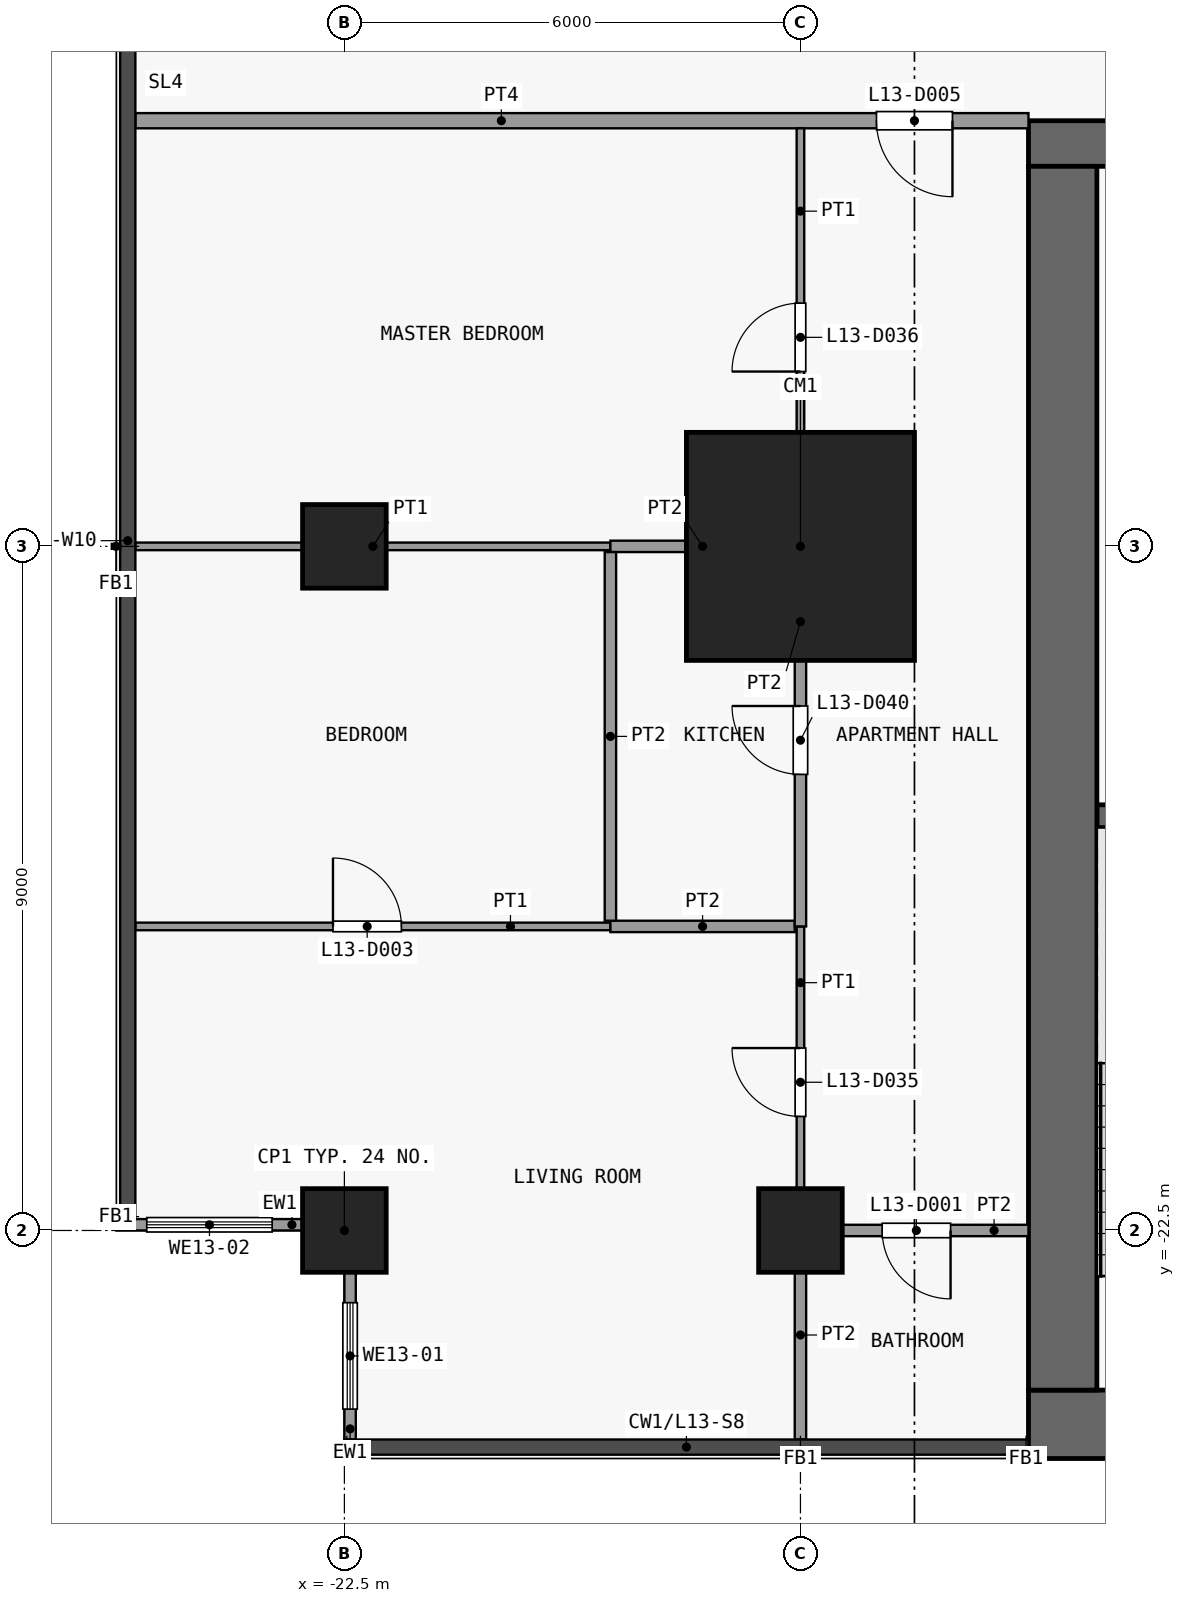
"""IFC4 building model, lengths in metres.
Left out: names, types, materials, properties, quantities, classifications, styles, units other than length and angle.
Written with IfcOpenShell. Run it as: python <this file> out.ifc"""

import sys

from ifc_helpers import new_model, si_unit, direction, frame, frame_2d, origin, origin_2d, place, context, subcontext, project, spatial, rectangle, extrude, element, fill, save


model = new_model("IFC4")
c1 = context("Model", 3, precision=1e-05, world=origin(), true_north=direction((0.0, 1.0)))
c2 = subcontext(c1, "Body", "Model", "MODEL_VIEW")
j1 = project(units=[si_unit("LENGTHUNIT", "METRE"), si_unit("PLANEANGLEUNIT", "RADIAN")], contexts=[c1])
p1 = place(None, origin())
s1 = spatial("IfcSite", under=j1, at=p1, CompositionType="ELEMENT")
p2 = place(p1, origin())
s2 = spatial("IfcBuilding", under=s1, at=p2, CompositionType="ELEMENT")
p3 = place(p2, frame((0.0, 0.0, 57.7)))
s3 = spatial("IfcBuildingStorey", under=s2, at=p3, CompositionType="ELEMENT", Elevation=57.7)
for number, where, z_axis, x_axis in (
    (1, (-22.5, -22.5, 0.0), (0.0, 0.0, 1.0), (1.0, 0.0, 0.0)),
    (2, (-22.5, -13.5, 0.0), (0.0, 0.0, 1.0), (1.0, 0.0, 0.0)),
    (3, (-16.5, -22.5, 0.0), (0.0, 0.0, 1.0), (1.0, 0.0, 0.0)),
):
    element("IfcColumn", number, at=place(p3, frame(where, z_axis=z_axis, x_axis=x_axis)), inside=s3, PredefinedType="COLUMN", context=c2, shape_type="SweptSolid", body=[
        extrude(rectangle(XDim=1.1, YDim=1.1, at=origin_2d()), origin(), (0.0, 0.0, 1.0), 3.6),
    ])
p4 = place(p3, frame((-16.5, -13.5, 0.0), z_axis=(0.0, 0.0, 1.0), x_axis=(1.0, 0.0, 0.0)))
e4 = element("IfcColumn", 4, at=p4, inside=s3, PredefinedType="COLUMN", context=c2, shape_type="SweptSolid", body=[
    extrude(rectangle(XDim=3.0, YDim=3.0, at=origin_2d()), origin(), (0.0, 0.0, 1.0), 3.6),
])
p5 = place(p3, frame((-13.5, -25.05, 0.0), z_axis=(0.0, 0.0, 1.0), x_axis=(1.0, 0.0, 0.0)))
e5 = element("IfcWall", 5, at=p5, inside=s3, PredefinedType="SHEAR", context=c2, shape_type="SweptSolid", body=[
    extrude(rectangle(XDim=27.0, YDim=0.9, at=frame_2d((13.5, 0.0))), origin(), (0.0, 0.0, 1.0), 3.3),
])
p6 = place(p3, frame((-13.5, -8.2, 0.0), z_axis=(0.0, 0.0, 1.0), x_axis=(1.0, 0.0, 0.0)))
e6 = element("IfcWall", 6, at=p6, inside=s3, PredefinedType="SHEAR", context=c2, shape_type="SweptSolid", body=[
    extrude(rectangle(XDim=27.0, YDim=0.6, at=frame_2d((13.5, 0.0))), origin(), (0.0, 0.0, 1.0), 3.3),
])
p7 = place(p6, frame((7.8, 0.0, 0.0)))
e7 = element("IfcOpeningElement", 7, at=p7, cuts=e6, PredefinedType="OPENING", context=c2, shape_type="SweptSolid", body=[
    extrude(rectangle(XDim=1.8, YDim=2.1, at=frame_2d((0.9, 1.05))), frame((0.0, 0.31, 0.0), z_axis=(0.0, -1.0, 0.0), x_axis=(1.0, 0.0, 0.0)), (0.0, 0.0, 1.0), 0.62),
])
p8 = place(p6, frame((17.4, 0.0, 0.0)))
e8 = element("IfcOpeningElement", 8, at=p8, cuts=e6, PredefinedType="OPENING", context=c2, shape_type="SweptSolid", body=[
    extrude(rectangle(XDim=1.8, YDim=2.1, at=frame_2d((0.9, 1.05))), frame((0.0, 0.31, 0.0), z_axis=(0.0, -1.0, 0.0), x_axis=(1.0, 0.0, 0.0)), (0.0, 0.0, 1.0), 0.62),
])
p9 = place(p6, frame((1.725, 0.0, 0.0)))
e9 = element("IfcOpeningElement", 9, at=p9, cuts=e6, PredefinedType="OPENING", context=c2, shape_type="SweptSolid", body=[
    extrude(rectangle(XDim=1.2, YDim=2.1, at=frame_2d((0.6, 1.05))), frame((0.0, 0.31, 0.0), z_axis=(0.0, -1.0, 0.0), x_axis=(1.0, 0.0, 0.0)), (0.0, 0.0, 1.0), 0.62),
])
p10 = place(p6, frame((23.375, 0.0, 0.0)))
e10 = element("IfcOpeningElement", 10, at=p10, cuts=e6, PredefinedType="OPENING", context=c2, shape_type="SweptSolid", body=[
    extrude(rectangle(XDim=0.9, YDim=2.1, at=frame_2d((0.45, 1.05))), frame((0.0, 0.31, 0.0), z_axis=(0.0, -1.0, 0.0), x_axis=(1.0, 0.0, 0.0)), (0.0, 0.0, 1.0), 0.62),
])
p11 = place(p3, frame((-13.05, -24.6, 0.0), z_axis=(0.0, 0.0, 1.0), x_axis=(0.0, 1.0, 0.0)))
e11 = element("IfcWall", 11, at=p11, inside=s3, PredefinedType="SHEAR", context=c2, shape_type="SweptSolid", body=[
    extrude(rectangle(XDim=16.1, YDim=0.9, at=frame_2d((8.05, 0.0))), origin(), (0.0, 0.0, 1.0), 3.3),
])
p12 = place(p3, frame((-12.6, -17.05, 0.0), z_axis=(0.0, 0.0, 1.0), x_axis=(1.0, 0.0, 0.0)))
e12 = element("IfcWall", 12, at=p12, inside=s3, PredefinedType="SHEAR", context=c2, shape_type="SweptSolid", body=[
    extrude(rectangle(XDim=2.85, YDim=0.3, at=frame_2d((1.425, 0.0))), origin(), (0.0, 0.0, 1.0), 3.3),
])
p13 = place(p3, frame((-22.425, -25.25, 0.0), z_axis=(0.0, 0.0, 1.0), x_axis=(0.0, 1.0, 0.0)))
e13 = element("IfcWall", 13, at=p13, inside=s3, PredefinedType="SOLIDWALL", context=c2, shape_type="SweptSolid", body=[
    extrude(rectangle(XDim=2.2, YDim=0.15, at=frame_2d((1.1, 0.0))), origin(), (0.0, 0.0, 1.0), 3.3),
])
p14 = place(p13, frame((0.4, 0.0, 0.9)))
e14 = element("IfcOpeningElement", 14, at=p14, cuts=e13, PredefinedType="OPENING", context=c2, shape_type="SweptSolid", body=[
    extrude(rectangle(XDim=1.4, YDim=2.4, at=frame_2d((0.7, 1.2))), frame((0.0, 0.085, 0.0), z_axis=(0.0, -1.0, 0.0), x_axis=(1.0, 0.0, 0.0)), (0.0, 0.0, 1.0), 0.17),
])
p15 = place(p3, frame((-23.05, -22.425, 0.0), z_axis=(0.0, 0.0, 1.0), x_axis=(-1.0, 0.0, 0.0)))
e15 = element("IfcWall", 15, at=p15, inside=s3, PredefinedType="SOLIDWALL", context=c2, shape_type="SweptSolid", body=[
    extrude(rectangle(XDim=2.45, YDim=0.15, at=frame_2d((1.225, 0.0))), origin(), (0.0, 0.0, 1.0), 3.3),
])
p16 = place(p15, frame((0.4, 0.0, 0.9)))
e16 = element("IfcOpeningElement", 16, at=p16, cuts=e15, PredefinedType="OPENING", context=c2, shape_type="SweptSolid", body=[
    extrude(rectangle(XDim=1.65, YDim=2.4, at=frame_2d((0.825, 1.2))), frame((0.0, 0.085, 0.0), z_axis=(0.0, -1.0, 0.0), x_axis=(1.0, 0.0, 0.0)), (0.0, 0.0, 1.0), 0.17),
])
p17 = place(p3, frame((-16.425, -22.5, 0.0), z_axis=(0.0, 0.0, 1.0), x_axis=(1.0, 0.0, 0.0)))
e17 = element("IfcWall", 17, at=p17, inside=s3, PredefinedType="PARTITIONING", context=c2, shape_type="SweptSolid", body=[
    extrude(rectangle(XDim=2.925, YDim=0.15, at=frame_2d((1.462, 0.0))), origin(), (0.0, 0.0, 1.0), 3.3),
])
p18 = place(p17, frame((1.0, 0.0, 0.0)))
e18 = element("IfcOpeningElement", 18, at=p18, cuts=e17, PredefinedType="OPENING", context=c2, shape_type="SweptSolid", body=[
    extrude(rectangle(XDim=0.9, YDim=2.1, at=frame_2d((0.45, 1.05))), frame((0.0, 0.085, 0.0), z_axis=(0.0, -1.0, 0.0), x_axis=(1.0, 0.0, 0.0)), (0.0, 0.0, 1.0), 0.17),
])
p19 = place(p3, frame((-25.25, -18.5, 0.0), z_axis=(0.0, 0.0, 1.0), x_axis=(1.0, 0.0, 0.0)))
e19 = element("IfcWall", 19, at=p19, inside=s3, PredefinedType="PARTITIONING", context=c2, shape_type="SweptSolid", body=[
    extrude(rectangle(XDim=6.25, YDim=0.1, at=frame_2d((3.125, 0.0))), origin(), (0.0, 0.0, 1.0), 3.3),
])
p20 = place(p19, frame((2.6, 0.0, 0.0)))
e20 = element("IfcOpeningElement", 20, at=p20, cuts=e19, PredefinedType="OPENING", context=c2, shape_type="SweptSolid", body=[
    extrude(rectangle(XDim=0.9, YDim=2.1, at=frame_2d((0.45, 1.05))), frame((0.0, 0.06, 0.0), z_axis=(0.0, -1.0, 0.0), x_axis=(1.0, 0.0, 0.0)), (0.0, 0.0, 1.0), 0.12),
])
p21 = place(p3, frame((-19.0, -18.5, 0.0), z_axis=(0.0, 0.0, 1.0), x_axis=(1.0, 0.0, 0.0)))
e21 = element("IfcWall", 21, at=p21, inside=s3, PredefinedType="PARTITIONING", context=c2, shape_type="SweptSolid", body=[
    extrude(rectangle(XDim=2.425, YDim=0.15, at=frame_2d((1.212, 0.0))), origin(), (0.0, 0.0, 1.0), 3.3),
])
p22 = place(p3, frame((-25.25, -13.5, 0.0), z_axis=(0.0, 0.0, 1.0), x_axis=(1.0, 0.0, 0.0)))
e22 = element("IfcWall", 22, at=p22, inside=s3, PredefinedType="PARTITIONING", context=c2, shape_type="SweptSolid", body=[
    extrude(rectangle(XDim=6.25, YDim=0.1, at=frame_2d((3.125, 0.0))), origin(), (0.0, 0.0, 1.0), 3.3),
])
p23 = place(p3, frame((-19.0, -13.5, 0.0), z_axis=(0.0, 0.0, 1.0), x_axis=(1.0, 0.0, 0.0)))
e23 = element("IfcWall", 23, at=p23, inside=s3, PredefinedType="PARTITIONING", context=c2, shape_type="SweptSolid", body=[
    extrude(rectangle(XDim=2.425, YDim=0.15, at=frame_2d((1.212, 0.0))), origin(), (0.0, 0.0, 1.0), 3.3),
])
p24 = place(p3, frame((-25.25, -7.9, 0.0), z_axis=(0.0, 0.0, 1.0), x_axis=(1.0, 0.0, 0.0)))
e24 = element("IfcWall", 24, at=p24, inside=s3, PredefinedType="PARTITIONING", context=c2, shape_type="SweptSolid", body=[
    extrude(rectangle(XDim=11.75, YDim=0.2, at=frame_2d((5.875, 0.0))), origin(), (0.0, 0.0, 1.0), 3.3),
])
p25 = place(p24, frame((9.75, 0.0, 0.0)))
e25 = element("IfcOpeningElement", 25, at=p25, cuts=e24, PredefinedType="OPENING", context=c2, shape_type="SweptSolid", body=[
    extrude(rectangle(XDim=1.0, YDim=2.1, at=frame_2d((0.5, 1.05))), frame((0.0, 0.11, 0.0), z_axis=(0.0, -1.0, 0.0), x_axis=(1.0, 0.0, 0.0)), (0.0, 0.0, 1.0), 0.22),
])
p26 = place(p3, frame((-19.0, -18.425, 0.0), z_axis=(0.0, 0.0, 1.0), x_axis=(0.0, 1.0, 0.0)))
e26 = element("IfcWall", 26, at=p26, inside=s3, PredefinedType="PARTITIONING", context=c2, shape_type="SweptSolid", body=[
    extrude(rectangle(XDim=4.85, YDim=0.15, at=frame_2d((2.425, 0.0))), origin(), (0.0, 0.0, 1.0), 3.3),
])
p27 = place(p3, frame((-16.5, -22.5, 0.0), z_axis=(0.0, 0.0, 1.0), x_axis=(0.0, 1.0, 0.0)))
e27 = element("IfcWall", 27, at=p27, inside=s3, PredefinedType="PARTITIONING", context=c2, shape_type="SweptSolid", body=[
    extrude(rectangle(XDim=4.0, YDim=0.1, at=frame_2d((2.0, 0.0))), origin(), (0.0, 0.0, 1.0), 3.3),
])
p28 = place(p27, frame((1.5, 0.0, 0.0)))
e28 = element("IfcOpeningElement", 28, at=p28, cuts=e27, PredefinedType="OPENING", context=c2, shape_type="SweptSolid", body=[
    extrude(rectangle(XDim=0.9, YDim=2.1, at=frame_2d((0.45, 1.05))), frame((0.0, 0.06, 0.0), z_axis=(0.0, -1.0, 0.0), x_axis=(1.0, 0.0, 0.0)), (0.0, 0.0, 1.0), 0.12),
])
p29 = place(p3, frame((-16.5, -13.5, 0.0), z_axis=(0.0, 0.0, 1.0), x_axis=(0.0, 1.0, 0.0)))
e29 = element("IfcWall", 29, at=p29, inside=s3, PredefinedType="PARTITIONING", context=c2, shape_type="SweptSolid", body=[
    extrude(rectangle(XDim=5.5, YDim=0.1, at=frame_2d((2.75, 0.0))), origin(), (0.0, 0.0, 1.0), 3.3),
])
p30 = place(p29, frame((2.3, 0.0, 0.0)))
e30 = element("IfcOpeningElement", 30, at=p30, cuts=e29, PredefinedType="OPENING", context=c2, shape_type="SweptSolid", body=[
    extrude(rectangle(XDim=0.9, YDim=2.1, at=frame_2d((0.45, 1.05))), frame((0.0, 0.06, 0.0), z_axis=(0.0, -1.0, 0.0), x_axis=(1.0, 0.0, 0.0)), (0.0, 0.0, 1.0), 0.12),
])
p31 = place(p3, frame((-16.5, -25.25, 0.0), z_axis=(0.0, 0.0, 1.0), x_axis=(0.0, 1.0, 0.0)))
e31 = element("IfcWall", 31, at=p31, inside=s3, PredefinedType="PARTITIONING", context=c2, shape_type="SweptSolid", body=[
    extrude(rectangle(XDim=2.75, YDim=0.15, at=frame_2d((1.375, 0.0))), origin(), (0.0, 0.0, 1.0), 3.3),
])
p32 = place(p3, frame((-16.5, -18.5, 0.0), z_axis=(0.0, 0.0, 1.0), x_axis=(0.0, 1.0, 0.0)))
e32 = element("IfcWall", 32, at=p32, inside=s3, PredefinedType="PARTITIONING", context=c2, shape_type="SweptSolid", body=[
    extrude(rectangle(XDim=5.0, YDim=0.15, at=frame_2d((2.5, 0.0))), origin(), (0.0, 0.0, 1.0), 3.3),
])
p33 = place(p32, frame((2.0, 0.0, 0.0)))
e33 = element("IfcOpeningElement", 33, at=p33, cuts=e32, PredefinedType="OPENING", context=c2, shape_type="SweptSolid", body=[
    extrude(rectangle(XDim=0.9, YDim=2.1, at=frame_2d((0.45, 1.05))), frame((0.0, 0.085, 0.0), z_axis=(0.0, -1.0, 0.0), x_axis=(1.0, 0.0, 0.0)), (0.0, 0.0, 1.0), 0.17),
])
p34 = place(p14, origin())
e34 = element("IfcWindow", 34, at=p34, inside=s3, PartitioningType="SINGLE_PANEL", PredefinedType="WINDOW", context=c2, shape_type="SweptSolid", body=[
    extrude(rectangle(XDim=1.4, YDim=2.4, at=frame_2d((0.7, 1.2))), frame((0.0, 0.03, 0.0), z_axis=(0.0, -1.0, 0.0), x_axis=(1.0, 0.0, 0.0)), (0.0, 0.0, 1.0), 0.06),
])
fill(e14, e34)
p35 = place(p16, origin())
e35 = element("IfcWindow", 35, at=p35, inside=s3, PartitioningType="SINGLE_PANEL", PredefinedType="WINDOW", context=c2, shape_type="SweptSolid", body=[
    extrude(rectangle(XDim=1.65, YDim=2.4, at=frame_2d((0.825, 1.2))), frame((0.0, 0.03, 0.0), z_axis=(0.0, -1.0, 0.0), x_axis=(1.0, 0.0, 0.0)), (0.0, 0.0, 1.0), 0.06),
])
fill(e16, e35)
p36 = place(p18, origin())
e36 = element("IfcDoor", 36, at=p36, inside=s3, OperationType="SINGLE_SWING_RIGHT", PredefinedType="DOOR", context=c2, shape_type="SweptSolid", body=[
    extrude(rectangle(XDim=0.9, YDim=2.1, at=frame_2d((0.45, 1.05))), frame((0.0, 0.025, 0.0), z_axis=(0.0, -1.0, 0.0), x_axis=(1.0, 0.0, 0.0)), (0.0, 0.0, 1.0), 0.05),
])
fill(e18, e36)
p37 = place(p20, origin())
e37 = element("IfcDoor", 37, at=p37, inside=s3, OperationType="SINGLE_SWING_RIGHT", PredefinedType="DOOR", context=c2, shape_type="SweptSolid", body=[
    extrude(rectangle(XDim=0.9, YDim=2.1, at=frame_2d((0.45, 1.05))), frame((0.0, 0.025, 0.0), z_axis=(0.0, -1.0, 0.0), x_axis=(1.0, 0.0, 0.0)), (0.0, 0.0, 1.0), 0.05),
])
fill(e20, e37)
p38 = place(p25, origin())
e38 = element("IfcDoor", 38, at=p38, inside=s3, OperationType="SINGLE_SWING_RIGHT", PredefinedType="DOOR", context=c2, shape_type="SweptSolid", body=[
    extrude(rectangle(XDim=1.0, YDim=2.1, at=frame_2d((0.5, 1.05))), frame((0.0, 0.025, 0.0), z_axis=(0.0, -1.0, 0.0), x_axis=(1.0, 0.0, 0.0)), (0.0, 0.0, 1.0), 0.05),
])
fill(e25, e38)
p39 = place(p28, origin())
e39 = element("IfcDoor", 39, at=p39, inside=s3, OperationType="SINGLE_SWING_LEFT", PredefinedType="DOOR", context=c2, shape_type="SweptSolid", body=[
    extrude(rectangle(XDim=0.9, YDim=2.1, at=frame_2d((0.45, 1.05))), frame((0.0, 0.025, 0.0), z_axis=(0.0, -1.0, 0.0), x_axis=(1.0, 0.0, 0.0)), (0.0, 0.0, 1.0), 0.05),
])
fill(e28, e39)
p40 = place(p30, origin())
e40 = element("IfcDoor", 40, at=p40, inside=s3, OperationType="SINGLE_SWING_RIGHT", PredefinedType="DOOR", context=c2, shape_type="SweptSolid", body=[
    extrude(rectangle(XDim=0.9, YDim=2.1, at=frame_2d((0.45, 1.05))), frame((0.0, 0.025, 0.0), z_axis=(0.0, -1.0, 0.0), x_axis=(1.0, 0.0, 0.0)), (0.0, 0.0, 1.0), 0.05),
])
fill(e30, e40)
p41 = place(p33, origin())
e41 = element("IfcDoor", 41, at=p41, inside=s3, OperationType="SINGLE_SWING_LEFT", PredefinedType="DOOR", context=c2, shape_type="SweptSolid", body=[
    extrude(rectangle(XDim=0.9, YDim=2.1, at=frame_2d((0.45, 1.05))), frame((0.0, 0.025, 0.0), z_axis=(0.0, -1.0, 0.0), x_axis=(1.0, 0.0, 0.0)), (0.0, 0.0, 1.0), 0.05),
])
fill(e33, e41)
save(model, sys.argv[1])
